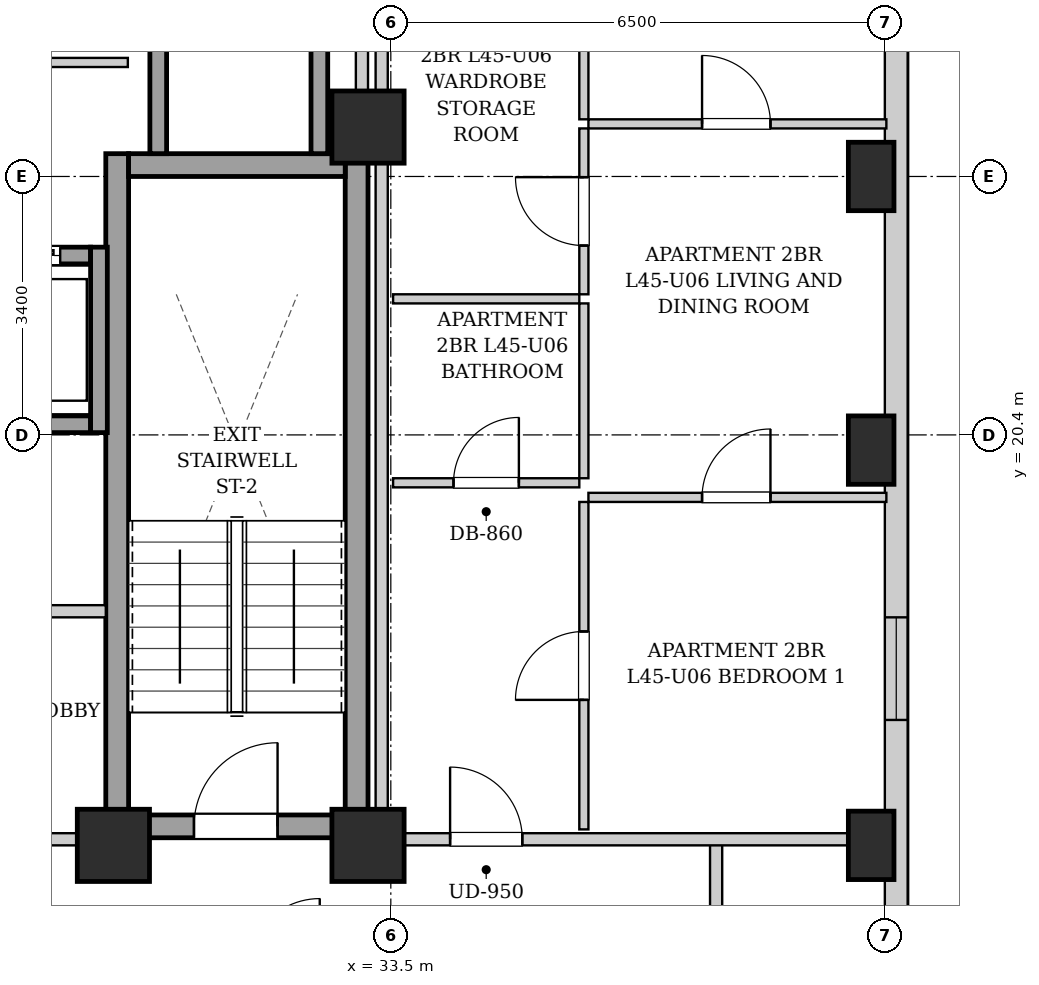
"""IFC4 building model, lengths in metres.
Left out: names, types, materials, properties, quantities, classifications, styles, units other than length and angle.
Written with IfcOpenShell. Run it as: python <this file> out.ifc"""

import sys

from ifc_helpers import new_model, si_unit, direction, frame, frame_2d, origin, origin_2d, place, context, subcontext, project, spatial, rectangle, extrude, element, fill, save


model = new_model("IFC4")
c1 = context("Model", 3, precision=1e-05, world=origin(), true_north=direction((0.0, 1.0)))
c2 = subcontext(c1, "Body", "Model", "MODEL_VIEW")
j1 = project(units=[si_unit("LENGTHUNIT", "METRE"), si_unit("PLANEANGLEUNIT", "RADIAN")], contexts=[c1])
p1 = place(None, origin())
s1 = spatial("IfcSite", under=j1, at=p1, CompositionType="ELEMENT")
p2 = place(p1, origin())
s2 = spatial("IfcBuilding", under=s1, at=p2, CompositionType="ELEMENT")
p3 = place(p2, frame((0.0, 0.0, 156.9)))
s3 = spatial("IfcBuildingStorey", under=s2, at=p3, CompositionType="ELEMENT", Elevation=156.9)
for number, where, z_axis, x_axis in (
    (1, (39.82, 15.0, 0.0), (0.0, 0.0, 1.0), (1.0, 0.0, 0.0)),
    (2, (39.82, 20.2, 0.0), (0.0, 0.0, 1.0), (1.0, 0.0, 0.0)),
    (3, (39.82, 23.8, 0.0), (0.0, 0.0, 1.0), (1.0, 0.0, 0.0)),
):
    element("IfcColumn", number, at=place(p3, frame(where, z_axis=z_axis, x_axis=x_axis)), inside=s3, PredefinedType="COLUMN", context=c2, shape_type="SweptSolid", body=[
        extrude(rectangle(XDim=0.6, YDim=0.9, at=origin_2d()), origin(), (0.0, 0.0, 1.0), 3.25),
    ])
for number, where, z_axis, x_axis in (
    (4, (29.85, 15.0, 0.0), (0.0, 0.0, 1.0), (1.0, 0.0, 0.0)),
    (5, (33.2, 15.0, 0.0), (0.0, 0.0, 1.0), (1.0, 0.0, 0.0)),
    (6, (33.2, 24.45, 0.0), (0.0, 0.0, 1.0), (1.0, 0.0, 0.0)),
):
    element("IfcColumn", number, at=place(p3, frame(where, z_axis=z_axis, x_axis=x_axis)), inside=s3, PredefinedType="COLUMN", context=c2, shape_type="SweptSolid", body=[
        extrude(rectangle(XDim=0.95, YDim=0.95, at=origin_2d()), origin(), (0.0, 0.0, 1.0), 3.25),
    ])
p4 = place(p3, frame((40.15, 40.8, 0.0), z_axis=(0.0, 0.0, 1.0), x_axis=(0.0, -1.0, 0.0)))
e7 = element("IfcWall", 7, at=p4, inside=s3, PredefinedType="SOLIDWALL", context=c2, shape_type="SweptSolid", body=[
    extrude(rectangle(XDim=34.5, YDim=0.3, at=frame_2d((17.25, 0.0))), origin(), (0.0, 0.0, 1.0), 2.99),
])
p5 = place(p4, frame((31.575, 0.0, 0.55)))
e8 = element("IfcOpeningElement", 8, at=p5, cuts=e7, PredefinedType="OPENING", context=c2, shape_type="SweptSolid", body=[
    extrude(rectangle(XDim=1.35, YDim=1.2, at=frame_2d((0.675, 0.6))), frame((0.0, 0.16, 0.0), z_axis=(0.0, -1.0, 0.0), x_axis=(1.0, 0.0, 0.0)), (0.0, 0.0, 1.0), 0.32),
])
p6 = place(p4, frame((3.075, 0.0, 0.55)))
e9 = element("IfcOpeningElement", 9, at=p6, cuts=e7, PredefinedType="OPENING", context=c2, shape_type="SweptSolid", body=[
    extrude(rectangle(XDim=1.35, YDim=1.2, at=frame_2d((0.675, 0.6))), frame((0.0, 0.16, 0.0), z_axis=(0.0, -1.0, 0.0), x_axis=(1.0, 0.0, 0.0)), (0.0, 0.0, 1.0), 0.32),
])
p7 = place(p4, frame((1.085, 0.0, 0.55)))
e10 = element("IfcOpeningElement", 10, at=p7, cuts=e7, PredefinedType="OPENING", context=c2, shape_type="SweptSolid", body=[
    extrude(rectangle(XDim=1.35, YDim=1.2, at=frame_2d((0.675, 0.6))), frame((0.0, 0.16, 0.0), z_axis=(0.0, -1.0, 0.0), x_axis=(1.0, 0.0, 0.0)), (0.0, 0.0, 1.0), 0.32),
])
p8 = place(p4, frame((22.8, 0.0, 0.55)))
e11 = element("IfcOpeningElement", 11, at=p8, cuts=e7, PredefinedType="OPENING", context=c2, shape_type="SweptSolid", body=[
    extrude(rectangle(XDim=1.35, YDim=1.2, at=frame_2d((0.675, 0.6))), frame((0.0, 0.16, 0.0), z_axis=(0.0, -1.0, 0.0), x_axis=(1.0, 0.0, 0.0)), (0.0, 0.0, 1.0), 0.32),
])
p9 = place(p4, frame((13.425, 0.0, 0.55)))
e12 = element("IfcOpeningElement", 12, at=p9, cuts=e7, PredefinedType="OPENING", context=c2, shape_type="SweptSolid", body=[
    extrude(rectangle(XDim=1.35, YDim=1.2, at=frame_2d((0.675, 0.6))), frame((0.0, 0.16, 0.0), z_axis=(0.0, -1.0, 0.0), x_axis=(1.0, 0.0, 0.0)), (0.0, 0.0, 1.0), 0.32),
])
for number, where, z_axis, x_axis in (
    (13, (29.9, 15.1, 0.0), (0.0, 0.0, 1.0), (0.0, 1.0, 0.0)),
    (14, (33.05, 15.1, 0.0), (0.0, 0.0, 1.0), (0.0, 1.0, 0.0)),
):
    element("IfcWall", number, at=place(p3, frame(where, z_axis=z_axis, x_axis=x_axis)), inside=s3, PredefinedType="SHEAR", context=c2, shape_type="SweptSolid", body=[
        extrude(rectangle(XDim=9.0, YDim=0.3, at=frame_2d((4.5, 0.0))), origin(), (0.0, 0.0, 1.0), 2.99),
    ])
p10 = place(p3, frame((30.05, 23.95, 0.0), z_axis=(0.0, 0.0, 1.0), x_axis=(1.0, 0.0, 0.0)))
e15 = element("IfcWall", 15, at=p10, inside=s3, PredefinedType="SHEAR", context=c2, shape_type="SweptSolid", body=[
    extrude(rectangle(XDim=2.85, YDim=0.3, at=frame_2d((1.425, 0.0))), origin(), (0.0, 0.0, 1.0), 2.99),
])
p11 = place(p3, frame((30.05, 15.25, 0.0), z_axis=(0.0, 0.0, 1.0), x_axis=(1.0, 0.0, 0.0)))
e16 = element("IfcWall", 16, at=p11, inside=s3, PredefinedType="SHEAR", context=c2, shape_type="SweptSolid", body=[
    extrude(rectangle(XDim=2.85, YDim=0.3, at=frame_2d((1.425, 0.0))), origin(), (0.0, 0.0, 1.0), 2.99),
])
p12 = place(p11, frame((0.86, 0.0, 0.0)))
e17 = element("IfcOpeningElement", 17, at=p12, cuts=e16, PredefinedType="OPENING", context=c2, shape_type="SweptSolid", body=[
    extrude(rectangle(XDim=1.1, YDim=2.05, at=frame_2d((0.55, 1.025))), frame((0.0, 0.16, 0.0), z_axis=(0.0, -1.0, 0.0), x_axis=(1.0, 0.0, 0.0)), (0.0, 0.0, 1.0), 0.32),
])
p13 = place(p3, frame((27.65, 20.54, 0.0), z_axis=(0.0, 0.0, 1.0), x_axis=(1.0, 0.0, 0.0)))
e18 = element("IfcWall", 18, at=p13, inside=s3, PredefinedType="SHEAR", context=c2, shape_type="SweptSolid", body=[
    extrude(rectangle(XDim=1.9, YDim=0.22, at=frame_2d((0.95, 0.0))), origin(), (0.0, 0.0, 1.0), 2.99),
])
p14 = place(p3, frame((27.65, 22.76, 0.0), z_axis=(0.0, 0.0, 1.0), x_axis=(1.0, 0.0, 0.0)))
e19 = element("IfcWall", 19, at=p14, inside=s3, PredefinedType="SHEAR", context=c2, shape_type="SweptSolid", body=[
    extrude(rectangle(XDim=1.9, YDim=0.22, at=frame_2d((0.95, 0.0))), origin(), (0.0, 0.0, 1.0), 2.99),
])
p15 = place(p14, frame((0.4, 0.0, 0.0)))
e20 = element("IfcOpeningElement", 20, at=p15, cuts=e19, PredefinedType="OPENING", context=c2, shape_type="SweptSolid", body=[
    extrude(rectangle(XDim=1.1, YDim=2.15, at=frame_2d((0.55, 1.075))), frame((0.0, 0.12, 0.0), z_axis=(0.0, -1.0, 0.0), x_axis=(1.0, 0.0, 0.0)), (0.0, 0.0, 1.0), 0.24),
])
p16 = place(p3, frame((29.66, 20.43, 0.0), z_axis=(0.0, 0.0, 1.0), x_axis=(0.0, 1.0, 0.0)))
e21 = element("IfcWall", 21, at=p16, inside=s3, PredefinedType="SHEAR", context=c2, shape_type="SweptSolid", body=[
    extrude(rectangle(XDim=2.44, YDim=0.22, at=frame_2d((1.22, 0.0))), origin(), (0.0, 0.0, 1.0), 2.99),
])
for number, where, z_axis, x_axis in (
    (22, (30.44, 24.1, 0.0), (0.0, 0.0, 1.0), (0.0, 1.0, 0.0)),
    (23, (32.56, 24.1, 0.0), (0.0, 0.0, 1.0), (0.0, 1.0, 0.0)),
):
    element("IfcWall", number, at=place(p3, frame(where, z_axis=z_axis, x_axis=x_axis)), inside=s3, PredefinedType="SHEAR", context=c2, shape_type="SweptSolid", body=[
        extrude(rectangle(XDim=2.07, YDim=0.22, at=frame_2d((1.035, 0.0))), origin(), (0.0, 0.0, 1.0), 2.99),
    ])
p17 = place(p3, frame((21.25, 15.08, 0.0), z_axis=(0.0, 0.0, 1.0), x_axis=(1.0, 0.0, 0.0)))
e24 = element("IfcWall", 24, at=p17, inside=s3, PredefinedType="PARTITIONING", context=c2, shape_type="SweptSolid", body=[
    extrude(rectangle(XDim=8.5, YDim=0.16, at=frame_2d((4.25, 0.0))), origin(), (0.0, 0.0, 1.0), 2.442),
])
p18 = place(p17, frame((3.725, 0.0, 0.0)))
e25 = element("IfcOpeningElement", 25, at=p18, cuts=e24, PredefinedType="OPENING", context=c2, shape_type="SweptSolid", body=[
    extrude(rectangle(XDim=1.05, YDim=2.05, at=frame_2d((0.525, 1.025))), frame((0.0, 0.09, 0.0), z_axis=(0.0, -1.0, 0.0), x_axis=(1.0, 0.0, 0.0)), (0.0, 0.0, 1.0), 0.18),
])
p19 = place(p3, frame((28.65, 18.08, 0.0), z_axis=(0.0, 0.0, 1.0), x_axis=(1.0, 0.0, 0.0)))
e26 = element("IfcWall", 26, at=p19, inside=s3, PredefinedType="PARTITIONING", context=c2, shape_type="SweptSolid", body=[
    extrude(rectangle(XDim=1.1, YDim=0.16, at=frame_2d((0.55, 0.0))), origin(), (0.0, 0.0, 1.0), 2.99),
])
p20 = place(p3, frame((33.12, 24.12, 0.0), z_axis=(0.0, 0.0, 1.0), x_axis=(0.0, 1.0, 0.0)))
e27 = element("IfcWall", 27, at=p20, inside=s3, PredefinedType="PARTITIONING", context=c2, shape_type="SweptSolid", body=[
    extrude(rectangle(XDim=4.76, YDim=0.16, at=frame_2d((2.38, 0.0))), origin(), (0.0, 0.0, 1.0), 2.325),
])
p21 = place(p3, frame((25.72, 25.3, 0.0), z_axis=(0.0, 0.0, 1.0), x_axis=(1.0, 0.0, 0.0)))
e28 = element("IfcWall", 28, at=p21, inside=s3, PredefinedType="PARTITIONING", context=c2, shape_type="SweptSolid", body=[
    extrude(rectangle(XDim=4.32, YDim=0.12, at=frame_2d((2.16, 0.0))), origin(), (0.0, 0.0, 1.0), 2.99),
])
p22 = place(p21, frame((1.65, 0.0, 0.0)))
e29 = element("IfcOpeningElement", 29, at=p22, cuts=e28, PredefinedType="OPENING", context=c2, shape_type="SweptSolid", body=[
    extrude(rectangle(XDim=0.9, YDim=2.05, at=frame_2d((0.45, 1.025))), frame((0.0, 0.07, 0.0), z_axis=(0.0, -1.0, 0.0), x_axis=(1.0, 0.0, 0.0)), (0.0, 0.0, 1.0), 0.14),
])
p23 = place(p3, frame((37.78, 13.35, 0.0), z_axis=(0.0, 0.0, 1.0), x_axis=(0.0, 1.0, 0.0)))
e30 = element("IfcWall", 30, at=p23, inside=s3, PredefinedType="PARTITIONING", context=c2, shape_type="SweptSolid", body=[
    extrude(rectangle(XDim=1.74, YDim=0.16, at=frame_2d((0.87, 0.0))), origin(), (0.0, 0.0, 1.0), 2.99),
])
p24 = place(p3, frame((33.38, 15.08, 0.0), z_axis=(0.0, 0.0, 1.0), x_axis=(1.0, 0.0, 0.0)))
e31 = element("IfcWall", 31, at=p24, inside=s3, PredefinedType="PARTITIONING", context=c2, shape_type="SweptSolid", body=[
    extrude(rectangle(XDim=6.64, YDim=0.16, at=frame_2d((3.32, 0.0))), origin(), (0.0, 0.0, 1.0), 2.442),
])
p25 = place(p24, frame((0.9, 0.0, 0.0)))
e32 = element("IfcOpeningElement", 32, at=p25, cuts=e31, PredefinedType="OPENING", context=c2, shape_type="SweptSolid", body=[
    extrude(rectangle(XDim=0.95, YDim=2.1, at=frame_2d((0.475, 1.05))), frame((0.0, 0.09, 0.0), z_axis=(0.0, -1.0, 0.0), x_axis=(1.0, 0.0, 0.0)), (0.0, 0.0, 1.0), 0.18),
])
p26 = place(p3, frame((33.53, 22.19, 0.0), z_axis=(0.0, 0.0, 1.0), x_axis=(1.0, 0.0, 0.0)))
e33 = element("IfcWall", 33, at=p26, inside=s3, PredefinedType="PARTITIONING", context=c2, shape_type="SweptSolid", body=[
    extrude(rectangle(XDim=2.45, YDim=0.12, at=frame_2d((1.225, 0.0))), origin(), (0.0, 0.0, 1.0), 2.99),
])
p27 = place(p3, frame((36.04, 22.25, 0.0), z_axis=(0.0, 0.0, 1.0), x_axis=(0.0, 1.0, 0.0)))
e34 = element("IfcWall", 34, at=p27, inside=s3, PredefinedType="PARTITIONING", context=c2, shape_type="SweptSolid", body=[
    extrude(rectangle(XDim=2.182, YDim=0.12, at=frame_2d((1.091, 0.0))), origin(), (0.0, 0.0, 1.0), 2.99),
])
p28 = place(p27, frame((0.641, 0.0, 0.0)))
e35 = element("IfcOpeningElement", 35, at=p28, cuts=e34, PredefinedType="OPENING", context=c2, shape_type="SweptSolid", body=[
    extrude(rectangle(XDim=0.9, YDim=2.05, at=frame_2d((0.45, 1.025))), frame((0.0, 0.07, 0.0), z_axis=(0.0, -1.0, 0.0), x_axis=(1.0, 0.0, 0.0)), (0.0, 0.0, 1.0), 0.14),
])
p29 = place(p3, frame((36.04, 24.552, 0.0), z_axis=(0.0, 0.0, 1.0), x_axis=(0.0, 1.0, 0.0)))
e36 = element("IfcWall", 36, at=p29, inside=s3, PredefinedType="PARTITIONING", context=c2, shape_type="SweptSolid", body=[
    extrude(rectangle(XDim=4.308, YDim=0.12, at=frame_2d((2.154, 0.0))), origin(), (0.0, 0.0, 1.0), 2.99),
])
p30 = place(p29, frame((1.704, 0.0, 0.0)))
e37 = element("IfcOpeningElement", 37, at=p30, cuts=e36, PredefinedType="OPENING", context=c2, shape_type="SweptSolid", body=[
    extrude(rectangle(XDim=0.9, YDim=2.05, at=frame_2d((0.45, 1.025))), frame((0.0, 0.07, 0.0), z_axis=(0.0, -1.0, 0.0), x_axis=(1.0, 0.0, 0.0)), (0.0, 0.0, 1.0), 0.14),
])
p31 = place(p3, frame((33.53, 19.77, 0.0), z_axis=(0.0, 0.0, 1.0), x_axis=(1.0, 0.0, 0.0)))
e38 = element("IfcWall", 38, at=p31, inside=s3, PredefinedType="PARTITIONING", context=c2, shape_type="SweptSolid", body=[
    extrude(rectangle(XDim=2.45, YDim=0.12, at=frame_2d((1.225, 0.0))), origin(), (0.0, 0.0, 1.0), 2.99),
])
p32 = place(p31, frame((0.795, 0.0, 0.0)))
e39 = element("IfcOpeningElement", 39, at=p32, cuts=e38, PredefinedType="OPENING", context=c2, shape_type="SweptSolid", body=[
    extrude(rectangle(XDim=0.86, YDim=2.05, at=frame_2d((0.43, 1.025))), frame((0.0, 0.07, 0.0), z_axis=(0.0, -1.0, 0.0), x_axis=(1.0, 0.0, 0.0)), (0.0, 0.0, 1.0), 0.14),
])
p33 = place(p3, frame((36.04, 19.83, 0.0), z_axis=(0.0, 0.0, 1.0), x_axis=(0.0, 1.0, 0.0)))
e40 = element("IfcWall", 40, at=p33, inside=s3, PredefinedType="PARTITIONING", context=c2, shape_type="SweptSolid", body=[
    extrude(rectangle(XDim=2.3, YDim=0.12, at=frame_2d((1.15, 0.0))), origin(), (0.0, 0.0, 1.0), 2.99),
])
p34 = place(p3, frame((36.04, 15.21, 0.0), z_axis=(0.0, 0.0, 1.0), x_axis=(0.0, 1.0, 0.0)))
e41 = element("IfcWall", 41, at=p34, inside=s3, PredefinedType="PARTITIONING", context=c2, shape_type="SweptSolid", body=[
    extrude(rectangle(XDim=4.308, YDim=0.12, at=frame_2d((2.154, 0.0))), origin(), (0.0, 0.0, 1.0), 2.99),
])
p35 = place(p34, frame((1.704, 0.0, 0.0)))
e42 = element("IfcOpeningElement", 42, at=p35, cuts=e41, PredefinedType="OPENING", context=c2, shape_type="SweptSolid", body=[
    extrude(rectangle(XDim=0.9, YDim=2.05, at=frame_2d((0.45, 1.025))), frame((0.0, 0.07, 0.0), z_axis=(0.0, -1.0, 0.0), x_axis=(1.0, 0.0, 0.0)), (0.0, 0.0, 1.0), 0.14),
])
p36 = place(p3, frame((36.1, 19.578, 0.0), z_axis=(0.0, 0.0, 1.0), x_axis=(1.0, 0.0, 0.0)))
e43 = element("IfcWall", 43, at=p36, inside=s3, PredefinedType="PARTITIONING", context=c2, shape_type="SweptSolid", body=[
    extrude(rectangle(XDim=3.92, YDim=0.12, at=frame_2d((1.96, 0.0))), origin(), (0.0, 0.0, 1.0), 2.99),
])
p37 = place(p36, frame((1.495, 0.0, 0.0)))
e44 = element("IfcOpeningElement", 44, at=p37, cuts=e43, PredefinedType="OPENING", context=c2, shape_type="SweptSolid", body=[
    extrude(rectangle(XDim=0.9, YDim=2.05, at=frame_2d((0.45, 1.025))), frame((0.0, 0.07, 0.0), z_axis=(0.0, -1.0, 0.0), x_axis=(1.0, 0.0, 0.0)), (0.0, 0.0, 1.0), 0.14),
])
p38 = place(p3, frame((36.1, 24.492, 0.0), z_axis=(0.0, 0.0, 1.0), x_axis=(1.0, 0.0, 0.0)))
e45 = element("IfcWall", 45, at=p38, inside=s3, PredefinedType="PARTITIONING", context=c2, shape_type="SweptSolid", body=[
    extrude(rectangle(XDim=3.92, YDim=0.12, at=frame_2d((1.96, 0.0))), origin(), (0.0, 0.0, 1.0), 2.621),
])
p39 = place(p38, frame((1.495, 0.0, 0.0)))
e46 = element("IfcOpeningElement", 46, at=p39, cuts=e45, PredefinedType="OPENING", context=c2, shape_type="SweptSolid", body=[
    extrude(rectangle(XDim=0.9, YDim=2.05, at=frame_2d((0.45, 1.025))), frame((0.0, 0.07, 0.0), z_axis=(0.0, -1.0, 0.0), x_axis=(1.0, 0.0, 0.0)), (0.0, 0.0, 1.0), 0.14),
])
p40 = place(p3, frame((33.38, 15.02, 0.0), z_axis=(0.0, 0.0, 1.0), x_axis=(0.0, 1.0, 0.0)))
e47 = element("IfcWall", 47, at=p40, inside=s3, PredefinedType="PARTITIONING", context=c2, shape_type="SweptSolid", body=[
    extrude(rectangle(XDim=13.98, YDim=0.16, at=frame_2d((6.99, 0.0))), origin(), (0.0, 0.0, 1.0), 2.325),
])
p41 = place(p12, origin())
e48 = element("IfcDoor", 48, at=p41, inside=s3, OperationType="SINGLE_SWING_RIGHT", PredefinedType="DOOR", context=c2, shape_type="SweptSolid", body=[
    extrude(rectangle(XDim=1.1, YDim=2.05, at=frame_2d((0.55, 1.025))), frame((0.0, 0.025, 0.0), z_axis=(0.0, -1.0, 0.0), x_axis=(1.0, 0.0, 0.0)), (0.0, 0.0, 1.0), 0.05),
])
fill(e17, e48)
p42 = place(p15, origin())
e49 = element("IfcDoor", 49, at=p42, inside=s3, OperationType="SLIDING_TO_LEFT", PredefinedType="DOOR", context=c2, shape_type="SweptSolid", body=[
    extrude(rectangle(XDim=1.1, YDim=2.15, at=frame_2d((0.55, 1.075))), frame((0.0, 0.025, 0.0), z_axis=(0.0, -1.0, 0.0), x_axis=(1.0, 0.0, 0.0)), (0.0, 0.0, 1.0), 0.05),
])
fill(e20, e49)
p43 = place(p25, origin())
e50 = element("IfcDoor", 50, at=p43, inside=s3, OperationType="SINGLE_SWING_LEFT", PredefinedType="DOOR", context=c2, shape_type="SweptSolid", body=[
    extrude(rectangle(XDim=0.95, YDim=2.1, at=frame_2d((0.475, 1.05))), frame((0.0, 0.025, 0.0), z_axis=(0.0, -1.0, 0.0), x_axis=(1.0, 0.0, 0.0)), (0.0, 0.0, 1.0), 0.05),
])
fill(e32, e50)
p44 = place(p28, origin())
e51 = element("IfcDoor", 51, at=p44, inside=s3, OperationType="SINGLE_SWING_RIGHT", PredefinedType="DOOR", context=c2, shape_type="SweptSolid", body=[
    extrude(rectangle(XDim=0.9, YDim=2.05, at=frame_2d((0.45, 1.025))), frame((0.0, 0.025, 0.0), z_axis=(0.0, -1.0, 0.0), x_axis=(1.0, 0.0, 0.0)), (0.0, 0.0, 1.0), 0.05),
])
fill(e35, e51)
p45 = place(p32, origin())
e52 = element("IfcDoor", 52, at=p45, inside=s3, OperationType="SINGLE_SWING_RIGHT", PredefinedType="DOOR", context=c2, shape_type="SweptSolid", body=[
    extrude(rectangle(XDim=0.86, YDim=2.05, at=frame_2d((0.43, 1.025))), frame((0.0, 0.025, 0.0), z_axis=(0.0, -1.0, 0.0), x_axis=(1.0, 0.0, 0.0)), (0.0, 0.0, 1.0), 0.05),
])
fill(e39, e52)
p46 = place(p35, origin())
e53 = element("IfcDoor", 53, at=p46, inside=s3, OperationType="SINGLE_SWING_LEFT", PredefinedType="DOOR", context=c2, shape_type="SweptSolid", body=[
    extrude(rectangle(XDim=0.9, YDim=2.05, at=frame_2d((0.45, 1.025))), frame((0.0, 0.025, 0.0), z_axis=(0.0, -1.0, 0.0), x_axis=(1.0, 0.0, 0.0)), (0.0, 0.0, 1.0), 0.05),
])
fill(e42, e53)
p47 = place(p37, origin())
e54 = element("IfcDoor", 54, at=p47, inside=s3, OperationType="SINGLE_SWING_RIGHT", PredefinedType="DOOR", context=c2, shape_type="SweptSolid", body=[
    extrude(rectangle(XDim=0.9, YDim=2.05, at=frame_2d((0.45, 1.025))), frame((0.0, 0.025, 0.0), z_axis=(0.0, -1.0, 0.0), x_axis=(1.0, 0.0, 0.0)), (0.0, 0.0, 1.0), 0.05),
])
fill(e44, e54)
p48 = place(p39, origin())
e55 = element("IfcDoor", 55, at=p48, inside=s3, OperationType="SINGLE_SWING_LEFT", PredefinedType="DOOR", context=c2, shape_type="SweptSolid", body=[
    extrude(rectangle(XDim=0.9, YDim=2.05, at=frame_2d((0.45, 1.025))), frame((0.0, 0.025, 0.0), z_axis=(0.0, -1.0, 0.0), x_axis=(1.0, 0.0, 0.0)), (0.0, 0.0, 1.0), 0.05),
])
fill(e46, e55)
p49 = place(p8, origin())
e56 = element("IfcWindow", 56, at=p49, inside=s3, PartitioningType="SINGLE_PANEL", PredefinedType="WINDOW", context=c2, shape_type="SweptSolid", body=[
    extrude(rectangle(XDim=1.35, YDim=1.2, at=frame_2d((0.675, 0.6))), frame((0.0, 0.03, 0.0), z_axis=(0.0, -1.0, 0.0), x_axis=(1.0, 0.0, 0.0)), (0.0, 0.0, 1.0), 0.06),
])
fill(e11, e56)
save(model, sys.argv[1])
